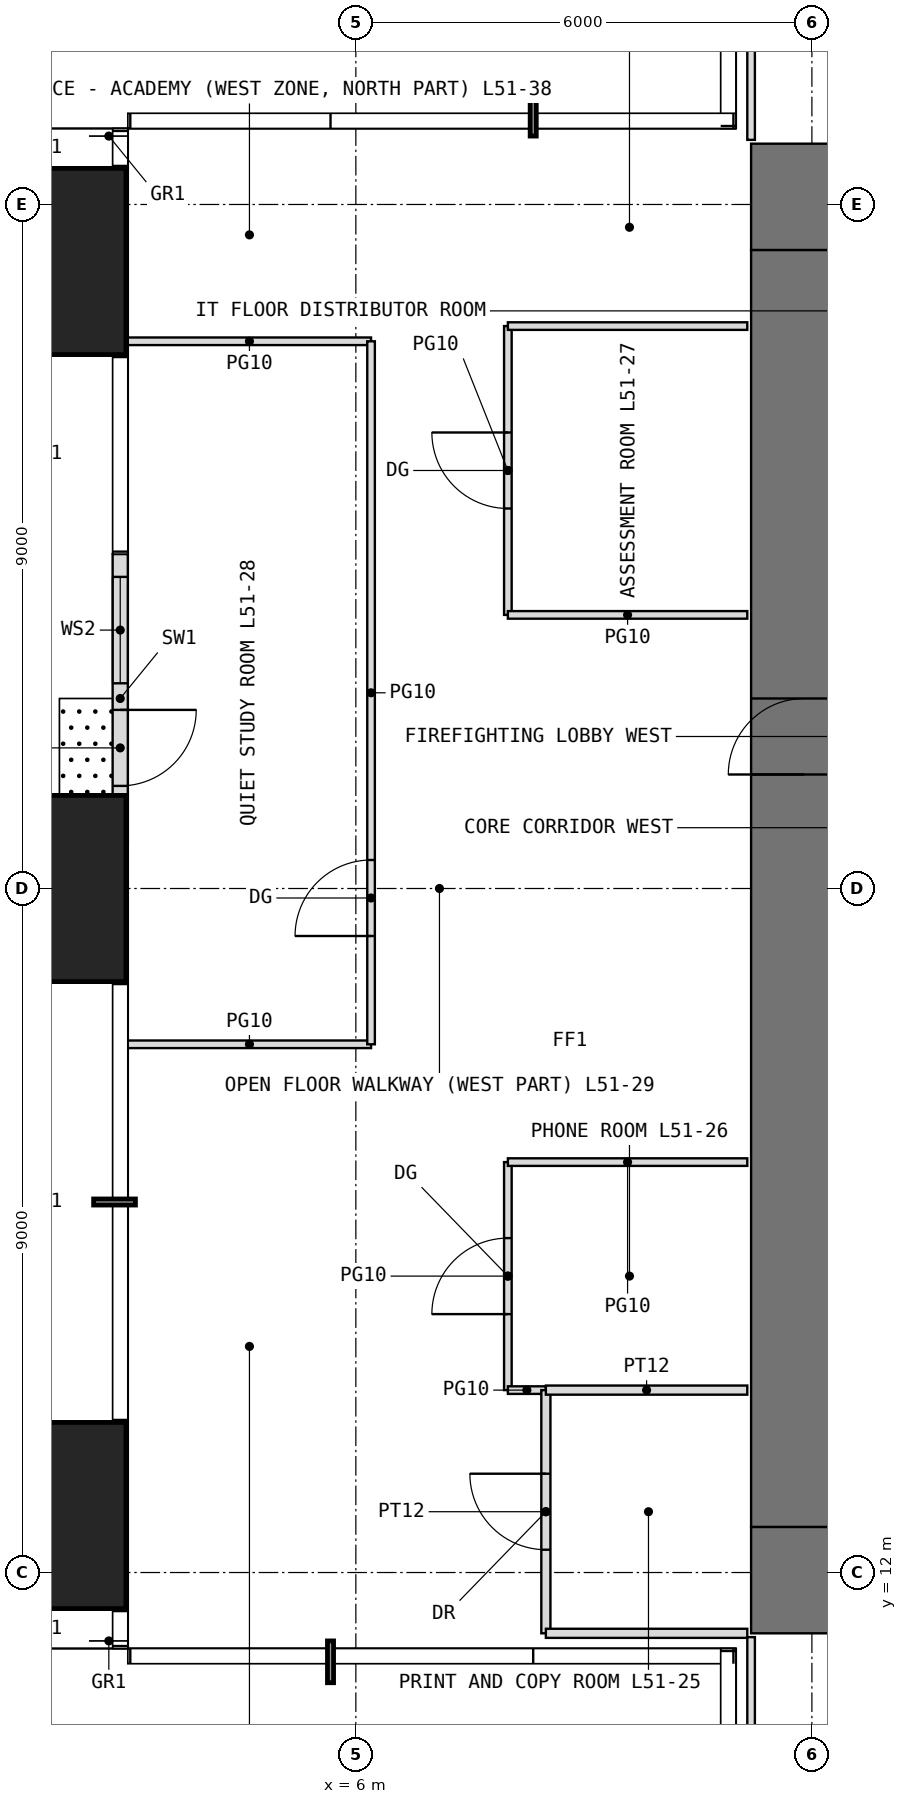
"""IFC4 building model, lengths in metres.
Left out: names, types, materials, properties, quantities, classifications, styles, units other than length and angle.
Written with IfcOpenShell. Run it as: python <this file> out.ifc"""

import sys

from ifc_helpers import new_model, si_unit, direction, frame, frame_2d, origin, origin_2d, place, context, subcontext, project, spatial, rectangle, extrude, element, fill, save


model = new_model("IFC4")
c1 = context("Model", 3, precision=1e-05, world=origin(), true_north=direction((0.0, 1.0)))
c2 = subcontext(c1, "Body", "Model", "MODEL_VIEW")
j1 = project(units=[si_unit("LENGTHUNIT", "METRE"), si_unit("PLANEANGLEUNIT", "RADIAN")], contexts=[c1])
p1 = place(None, origin())
s1 = spatial("IfcSite", under=j1, at=p1, CompositionType="ELEMENT")
p2 = place(p1, origin())
s2 = spatial("IfcBuilding", under=s1, at=p2, CompositionType="ELEMENT")
p3 = place(p2, frame((0.0, 0.0, 214.5)))
s3 = spatial("IfcBuildingStorey", under=s2, at=p3, CompositionType="ELEMENT", Elevation=214.5)
for number, where, z_axis, x_axis in (
    (1, (1.75, 12.75, 0.0), (0.0, 0.0, 1.0), (1.0, 0.0, 0.0)),
    (2, (1.75, 21.0, 0.0), (0.0, 0.0, 1.0), (1.0, 0.0, 0.0)),
    (3, (1.75, 29.25, 0.0), (0.0, 0.0, 1.0), (1.0, 0.0, 0.0)),
):
    element("IfcColumn", number, at=place(p3, frame(where, z_axis=z_axis, x_axis=x_axis)), inside=s3, PredefinedType="COLUMN", context=c2, shape_type="SweptSolid", body=[
        extrude(rectangle(XDim=2.45, YDim=2.45, at=origin_2d()), origin(), (0.0, 0.0, 1.0), 4.0),
    ])
p4 = place(p3, frame((2.9, 25.4, 0.0), z_axis=(0.0, 0.0, 1.0), x_axis=(0.0, -1.0, 0.0)))
e4 = element("IfcWall", 4, at=p4, inside=s3, PredefinedType="USERDEFINED", context=c2, shape_type="SweptSolid", body=[
    extrude(rectangle(XDim=3.8, YDim=0.2, at=frame_2d((1.9, 0.0))), origin(), (0.0, 0.0, 1.0), 3.75),
])
p5 = place(p4, frame((2.05, 0.0, 0.0)))
e5 = element("IfcOpeningElement", 5, at=p5, cuts=e4, PredefinedType="OPENING", context=c2, shape_type="SweptSolid", body=[
    extrude(rectangle(XDim=1.0, YDim=2.4, at=frame_2d((0.5, 1.2))), frame((0.0, 0.11, 0.0), z_axis=(0.0, -1.0, 0.0), x_axis=(1.0, 0.0, 0.0)), (0.0, 0.0, 1.0), 0.22),
])
p6 = place(p4, frame((0.3, 0.0, 0.3)))
e6 = element("IfcOpeningElement", 6, at=p6, cuts=e4, PredefinedType="OPENING", context=c2, shape_type="SweptSolid", body=[
    extrude(rectangle(XDim=1.4, YDim=2.7, at=frame_2d((0.7, 1.35))), frame((0.0, 0.11, 0.0), z_axis=(0.0, -1.0, 0.0), x_axis=(1.0, 0.0, 0.0)), (0.0, 0.0, 1.0), 0.22),
])
p7 = place(p3, frame((11.2, 11.9, -0.05), z_axis=(0.0, 0.0, 1.0), x_axis=(1.0, 0.0, 0.0)))
e7 = element("IfcWall", 7, at=p7, inside=s3, PredefinedType="SHEAR", context=c2, shape_type="SweptSolid", body=[
    extrude(rectangle(XDim=19.6, YDim=1.4, at=frame_2d((9.8, 0.0))), origin(), (0.0, 0.0, 1.0), 4.0),
])
p8 = place(p7, frame((8.8, 0.0, 0.05)))
e8 = element("IfcOpeningElement", 8, at=p8, cuts=e7, PredefinedType="OPENING", context=c2, shape_type="SweptSolid", body=[
    extrude(rectangle(XDim=2.0, YDim=2.2, at=frame_2d((1.0, 1.1))), frame((0.0, 0.71, 0.0), z_axis=(0.0, -1.0, 0.0), x_axis=(1.0, 0.0, 0.0)), (0.0, 0.0, 1.0), 1.42),
])
p9 = place(p3, frame((11.2, 30.1, -0.05), z_axis=(0.0, 0.0, 1.0), x_axis=(1.0, 0.0, 0.0)))
e9 = element("IfcWall", 9, at=p9, inside=s3, PredefinedType="SHEAR", context=c2, shape_type="SweptSolid", body=[
    extrude(rectangle(XDim=19.6, YDim=1.4, at=frame_2d((9.8, 0.0))), origin(), (0.0, 0.0, 1.0), 4.0),
])
p10 = place(p9, frame((8.8, 0.0, 0.05)))
e10 = element("IfcOpeningElement", 10, at=p10, cuts=e9, PredefinedType="OPENING", context=c2, shape_type="SweptSolid", body=[
    extrude(rectangle(XDim=2.0, YDim=2.2, at=frame_2d((1.0, 1.1))), frame((0.0, 0.71, 0.0), z_axis=(0.0, -1.0, 0.0), x_axis=(1.0, 0.0, 0.0)), (0.0, 0.0, 1.0), 1.42),
])
p11 = place(p3, frame((11.9, 12.6, -0.05), z_axis=(0.0, 0.0, 1.0), x_axis=(0.0, 1.0, 0.0)))
e11 = element("IfcWall", 11, at=p11, inside=s3, PredefinedType="SHEAR", context=c2, shape_type="SweptSolid", body=[
    extrude(rectangle(XDim=16.8, YDim=1.4, at=frame_2d((8.4, 0.0))), origin(), (0.0, 0.0, 1.0), 4.0),
])
p12 = place(p11, frame((9.9, 0.0, 0.05)))
e12 = element("IfcOpeningElement", 12, at=p12, cuts=e11, PredefinedType="OPENING", context=c2, shape_type="SweptSolid", body=[
    extrude(rectangle(XDim=1.0, YDim=2.2, at=frame_2d((0.5, 1.1))), frame((0.0, 0.71, 0.0), z_axis=(0.0, -1.0, 0.0), x_axis=(1.0, 0.0, 0.0)), (0.0, 0.0, 1.0), 1.42),
])
for number, where, z_axis, x_axis in (
    (13, (3.0, 18.95, 0.0), (0.0, 0.0, 1.0), (1.0, 0.0, 0.0)),
    (14, (3.0, 28.2, 0.0), (0.0, 0.0, 1.0), (1.0, 0.0, 0.0)),
):
    element("IfcWall", number, at=place(p3, frame(where, z_axis=z_axis, x_axis=x_axis)), inside=s3, PredefinedType="PARTITIONING", context=c2, shape_type="SweptSolid", body=[
        extrude(rectangle(XDim=3.2, YDim=0.1, at=frame_2d((1.6, 0.0))), origin(), (0.0, 0.0, 1.0), 3.75),
    ])
p13 = place(p3, frame((6.2, 18.95, 0.0), z_axis=(0.0, 0.0, 1.0), x_axis=(0.0, 1.0, 0.0)))
e15 = element("IfcWall", 15, at=p13, inside=s3, PredefinedType="PARTITIONING", context=c2, shape_type="SweptSolid", body=[
    extrude(rectangle(XDim=9.25, YDim=0.1, at=frame_2d((4.625, 0.0))), origin(), (0.0, 0.0, 1.0), 3.75),
])
p14 = place(p13, frame((1.425, 0.0, 0.0)))
e16 = element("IfcOpeningElement", 16, at=p14, cuts=e15, PredefinedType="OPENING", context=c2, shape_type="SweptSolid", body=[
    extrude(rectangle(XDim=1.0, YDim=2.4, at=frame_2d((0.5, 1.2))), frame((0.0, 0.06, 0.0), z_axis=(0.0, -1.0, 0.0), x_axis=(1.0, 0.0, 0.0)), (0.0, 0.0, 1.0), 0.12),
])
p15 = place(p3, frame((8.0, 14.4, 0.0), z_axis=(0.0, 0.0, 1.0), x_axis=(0.0, 1.0, 0.0)))
e17 = element("IfcWall", 17, at=p15, inside=s3, PredefinedType="PARTITIONING", context=c2, shape_type="SweptSolid", body=[
    extrude(rectangle(XDim=3.0, YDim=0.1, at=frame_2d((1.5, 0.0))), origin(), (0.0, 0.0, 1.0), 3.75),
])
p16 = place(p15, frame((1.0, 0.0, 0.0)))
e18 = element("IfcOpeningElement", 18, at=p16, cuts=e17, PredefinedType="OPENING", context=c2, shape_type="SweptSolid", body=[
    extrude(rectangle(XDim=1.0, YDim=2.4, at=frame_2d((0.5, 1.2))), frame((0.0, 0.06, 0.0), z_axis=(0.0, -1.0, 0.0), x_axis=(1.0, 0.0, 0.0)), (0.0, 0.0, 1.0), 0.12),
])
p17 = place(p3, frame((8.0, 14.4, 0.0), z_axis=(0.0, 0.0, 1.0), x_axis=(1.0, 0.0, 0.0)))
e19 = element("IfcWall", 19, at=p17, inside=s3, PredefinedType="PARTITIONING", context=c2, shape_type="SweptSolid", body=[
    extrude(rectangle(XDim=0.5, YDim=0.1, at=frame_2d((0.25, 0.0))), origin(), (0.0, 0.0, 1.0), 3.75),
])
p18 = place(p3, frame((8.0, 17.4, 0.0), z_axis=(0.0, 0.0, 1.0), x_axis=(1.0, 0.0, 0.0)))
e20 = element("IfcWall", 20, at=p18, inside=s3, PredefinedType="PARTITIONING", context=c2, shape_type="SweptSolid", body=[
    extrude(rectangle(XDim=3.15, YDim=0.1, at=frame_2d((1.575, 0.0))), origin(), (0.0, 0.0, 1.0), 3.75),
])
p19 = place(p3, frame((8.0, 24.6, 0.0), z_axis=(0.0, 0.0, 1.0), x_axis=(0.0, 1.0, 0.0)))
e21 = element("IfcWall", 21, at=p19, inside=s3, PredefinedType="PARTITIONING", context=c2, shape_type="SweptSolid", body=[
    extrude(rectangle(XDim=3.8, YDim=0.1, at=frame_2d((1.9, 0.0))), origin(), (0.0, 0.0, 1.0), 3.75),
])
p20 = place(p19, frame((1.4, 0.0, 0.0)))
e22 = element("IfcOpeningElement", 22, at=p20, cuts=e21, PredefinedType="OPENING", context=c2, shape_type="SweptSolid", body=[
    extrude(rectangle(XDim=1.0, YDim=2.4, at=frame_2d((0.5, 1.2))), frame((0.0, 0.06, 0.0), z_axis=(0.0, -1.0, 0.0), x_axis=(1.0, 0.0, 0.0)), (0.0, 0.0, 1.0), 0.12),
])
for number, where, z_axis, x_axis in (
    (23, (8.0, 24.6, 0.0), (0.0, 0.0, 1.0), (1.0, 0.0, 0.0)),
    (24, (8.0, 28.4, 0.0), (0.0, 0.0, 1.0), (1.0, 0.0, 0.0)),
):
    element("IfcWall", number, at=place(p3, frame(where, z_axis=z_axis, x_axis=x_axis)), inside=s3, PredefinedType="PARTITIONING", context=c2, shape_type="SweptSolid", body=[
        extrude(rectangle(XDim=3.15, YDim=0.1, at=frame_2d((1.575, 0.0))), origin(), (0.0, 0.0, 1.0), 3.75),
    ])
p21 = place(p3, frame((8.5, 11.2, 0.0), z_axis=(0.0, 0.0, 1.0), x_axis=(0.0, 1.0, 0.0)))
e25 = element("IfcWall", 25, at=p21, inside=s3, PredefinedType="PARTITIONING", context=c2, shape_type="SweptSolid", body=[
    extrude(rectangle(XDim=3.2, YDim=0.12, at=frame_2d((1.6, 0.0))), origin(), (0.0, 0.0, 1.0), 3.75),
])
p22 = place(p21, frame((1.1, 0.0, 0.0)))
e26 = element("IfcOpeningElement", 26, at=p22, cuts=e25, PredefinedType="OPENING", context=c2, shape_type="SweptSolid", body=[
    extrude(rectangle(XDim=1.0, YDim=2.2, at=frame_2d((0.5, 1.1))), frame((0.0, 0.07, 0.0), z_axis=(0.0, -1.0, 0.0), x_axis=(1.0, 0.0, 0.0)), (0.0, 0.0, 1.0), 0.14),
])
for number, where, z_axis, x_axis in (
    (27, (8.5, 11.2, 0.0), (0.0, 0.0, 1.0), (1.0, 0.0, 0.0)),
    (28, (8.5, 14.4, 0.0), (0.0, 0.0, 1.0), (1.0, 0.0, 0.0)),
):
    element("IfcWall", number, at=place(p3, frame(where, z_axis=z_axis, x_axis=x_axis)), inside=s3, PredefinedType="PARTITIONING", context=c2, shape_type="SweptSolid", body=[
        extrude(rectangle(XDim=2.65, YDim=0.12, at=frame_2d((1.325, 0.0))), origin(), (0.0, 0.0, 1.0), 3.75),
    ])
p23 = place(p3, frame((11.2, 5.6, 0.0), z_axis=(0.0, 0.0, 1.0), x_axis=(0.0, 1.0, 0.0)))
e29 = element("IfcWall", 29, at=p23, inside=s3, PredefinedType="PARTITIONING", context=c2, shape_type="SweptSolid", body=[
    extrude(rectangle(XDim=5.55, YDim=0.1, at=frame_2d((2.775, 0.0))), origin(), (0.0, 0.0, 1.0), 3.75),
])
p24 = place(p3, frame((11.2, 30.85, 0.0), z_axis=(0.0, 0.0, 1.0), x_axis=(0.0, 1.0, 0.0)))
e30 = element("IfcWall", 30, at=p24, inside=s3, PredefinedType="PARTITIONING", context=c2, shape_type="SweptSolid", body=[
    extrude(rectangle(XDim=4.95, YDim=0.1, at=frame_2d((2.475, 0.0))), origin(), (0.0, 0.0, 1.0), 3.75),
])
p25 = place(p5, origin())
e31 = element("IfcDoor", 31, at=p25, inside=s3, OperationType="SINGLE_SWING_LEFT", PredefinedType="DOOR", context=c2, shape_type="SweptSolid", body=[
    extrude(rectangle(XDim=1.0, YDim=2.4, at=frame_2d((0.5, 1.2))), frame((0.0, 0.025, 0.0), z_axis=(0.0, -1.0, 0.0), x_axis=(1.0, 0.0, 0.0)), (0.0, 0.0, 1.0), 0.05),
])
fill(e5, e31)
p26 = place(p6, origin())
e32 = element("IfcWindow", 32, at=p26, inside=s3, PartitioningType="SINGLE_PANEL", PredefinedType="WINDOW", context=c2, shape_type="SweptSolid", body=[
    extrude(rectangle(XDim=1.4, YDim=2.7, at=frame_2d((0.7, 1.35))), frame((0.0, 0.03, 0.0), z_axis=(0.0, -1.0, 0.0), x_axis=(1.0, 0.0, 0.0)), (0.0, 0.0, 1.0), 0.06),
])
fill(e6, e32)
p27 = place(p12, origin())
e33 = element("IfcDoor", 33, at=p27, inside=s3, OperationType="SINGLE_SWING_LEFT", PredefinedType="DOOR", context=c2, shape_type="SweptSolid", body=[
    extrude(rectangle(XDim=1.0, YDim=2.2, at=frame_2d((0.5, 1.1))), frame((0.0, 0.025, 0.0), z_axis=(0.0, -1.0, 0.0), x_axis=(1.0, 0.0, 0.0)), (0.0, 0.0, 1.0), 0.05),
])
fill(e12, e33)
p28 = place(p22, origin())
e34 = element("IfcDoor", 34, at=p28, inside=s3, OperationType="SINGLE_SWING_RIGHT", PredefinedType="DOOR", context=c2, shape_type="SweptSolid", body=[
    extrude(rectangle(XDim=1.0, YDim=2.2, at=frame_2d((0.5, 1.1))), frame((0.0, 0.025, 0.0), z_axis=(0.0, -1.0, 0.0), x_axis=(1.0, 0.0, 0.0)), (0.0, 0.0, 1.0), 0.05),
])
fill(e26, e34)
p29 = place(p16, origin())
e35 = element("IfcDoor", 35, at=p29, inside=s3, OperationType="SINGLE_SWING_LEFT", PredefinedType="DOOR", context=c2, shape_type="SweptSolid", body=[
    extrude(rectangle(XDim=1.0, YDim=2.4, at=frame_2d((0.5, 1.2))), frame((0.0, 0.025, 0.0), z_axis=(0.0, -1.0, 0.0), x_axis=(1.0, 0.0, 0.0)), (0.0, 0.0, 1.0), 0.05),
])
fill(e18, e35)
p30 = place(p20, origin())
e36 = element("IfcDoor", 36, at=p30, inside=s3, OperationType="SINGLE_SWING_RIGHT", PredefinedType="DOOR", context=c2, shape_type="SweptSolid", body=[
    extrude(rectangle(XDim=1.0, YDim=2.4, at=frame_2d((0.5, 1.2))), frame((0.0, 0.025, 0.0), z_axis=(0.0, -1.0, 0.0), x_axis=(1.0, 0.0, 0.0)), (0.0, 0.0, 1.0), 0.05),
])
fill(e22, e36)
p31 = place(p14, origin())
e37 = element("IfcDoor", 37, at=p31, inside=s3, OperationType="SINGLE_SWING_LEFT", PredefinedType="DOOR", context=c2, shape_type="SweptSolid", body=[
    extrude(rectangle(XDim=1.0, YDim=2.4, at=frame_2d((0.5, 1.2))), frame((0.0, 0.025, 0.0), z_axis=(0.0, -1.0, 0.0), x_axis=(1.0, 0.0, 0.0)), (0.0, 0.0, 1.0), 0.05),
])
fill(e16, e37)
save(model, sys.argv[1])
